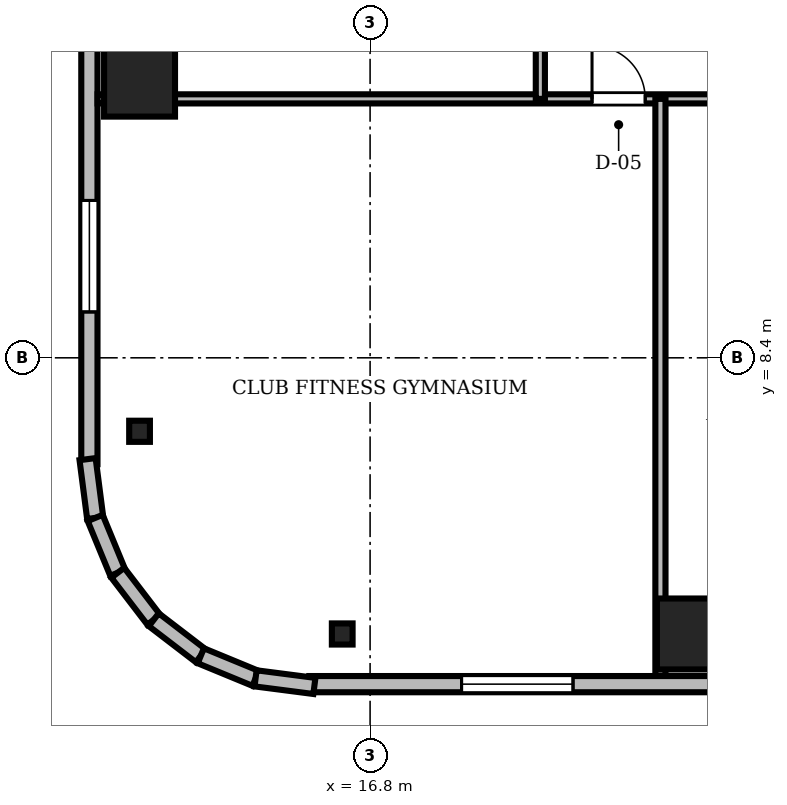
"""IFC4 building model, lengths in metres.
Left out: names, types, materials, properties, quantities, classifications, styles, units other than length and angle.
Written with IfcOpenShell. Run it as: python <this file> out.ifc"""

import sys

from ifc_helpers import new_model, si_unit, direction, frame, frame_2d, origin, origin_2d, place, context, subcontext, project, spatial, rectangle, i_section, extrude, source, transform, mapped, element, fill, save


model = new_model("IFC4")
c1 = context("Model", 3, precision=1e-05, world=origin(), true_north=direction((0.0, 1.0)))
c2 = subcontext(c1, "Body", "Model", "MODEL_VIEW")
j1 = project(units=[si_unit("LENGTHUNIT", "METRE"), si_unit("PLANEANGLEUNIT", "RADIAN")], contexts=[c1])
p1 = place(None, origin())
s1 = spatial("IfcSite", under=j1, at=p1, CompositionType="ELEMENT")
p2 = place(p1, origin())
s2 = spatial("IfcBuilding", under=s1, at=p2, CompositionType="ELEMENT")
p3 = place(p2, frame((0.0, 0.0, 177.2)))
s3 = spatial("IfcBuildingStorey", under=s2, at=p3, CompositionType="ELEMENT", Elevation=177.2)
m1 = source(origin(), c2, "Body", "SweptSolid", [
    extrude(rectangle(XDim=1.4, YDim=1.4, at=origin_2d()), origin(), (0.0, 0.0, 1.0), 3.58),
])
for number, where, z_axis, x_axis in (
    (1, (23.16, 2.95, 0.0), (0.0, 0.0, 1.0), (1.0, 0.0, 0.0)),
    (2, (12.25, 13.86, 0.0), (0.0, 0.0, 1.0), (1.0, 0.0, 0.0)),
):
    element("IfcColumn", number, at=place(p3, frame(where, z_axis=z_axis, x_axis=x_axis)), inside=s3, PredefinedType="COLUMN", context=c2, shape_type="MappedRepresentation", body=[
        mapped(m1, transform((0.0, 0.0, 0.0), scale=1.0)),
    ])
m2 = source(origin(), c2, "Body", "SweptSolid", [
    extrude(i_section(OverallWidth=0.409, OverallDepth=0.417, WebThickness=0.021, FlangeThickness=0.033, FilletRadius=0.015, at=origin_2d()), origin(), (0.0, 0.0, 1.0), 3.58),
])
for number, where, z_axis, x_axis in (
    (3, (16.25, 2.95, 0.0), (0.0, 0.0, 1.0), (1.0, 0.0, 0.0)),
    (4, (12.25, 6.95, 0.0), (0.0, 0.0, 1.0), (1.0, 0.0, 0.0)),
):
    element("IfcColumn", number, at=place(p3, frame(where, z_axis=z_axis, x_axis=x_axis)), inside=s3, PredefinedType="COLUMN", context=c2, shape_type="MappedRepresentation", body=[
        mapped(m2, transform((0.0, 0.0, 0.0), scale=1.0)),
    ])
m3 = source(origin(), c2, "Body", "SweptSolid", [
    extrude(rectangle(XDim=15.6, YDim=0.32, at=frame_2d((7.8, 0.0))), origin(), (0.0, 0.0, 1.0), 3.58),
])
p4 = place(p3, frame((15.6, 1.96, 0.0), z_axis=(0.0, 0.0, 1.0), x_axis=(1.0, 0.0, 0.0)))
e5 = element("IfcWall", 5, at=p4, inside=s3, PredefinedType="SOLIDWALL", context=c2, shape_type="MappedRepresentation", body=[
    mapped(m3, transform((0.0, 0.0, 0.0), scale=1.0)),
])
m4 = source(origin(), c2, "Body", "SweptSolid", [
    extrude(rectangle(XDim=1.4, YDim=2.3, at=frame_2d((0.7, 1.15))), frame((0.0, 0.17, 0.0), z_axis=(0.0, -1.0, 0.0), x_axis=(1.0, 0.0, 0.0)), (0.0, 0.0, 1.0), 0.34),
])
p5 = place(p4, frame((9.61, 0.0, 0.0)))
e6 = element("IfcOpeningElement", 6, at=p5, cuts=e5, PredefinedType="OPENING", context=c2, shape_type="MappedRepresentation", body=[
    mapped(m4, transform((0.0, 0.0, 0.0), scale=1.0)),
])
m5 = source(origin(), c2, "Body", "SweptSolid", [
    extrude(rectangle(XDim=2.2, YDim=2.4, at=frame_2d((1.1, 1.2))), frame((0.0, 0.17, 0.0), z_axis=(0.0, -1.0, 0.0), x_axis=(1.0, 0.0, 0.0)), (0.0, 0.0, 1.0), 0.34),
])
p6 = place(p4, frame((3.005, 0.0, 0.72)))
e7 = element("IfcOpeningElement", 7, at=p6, cuts=e5, PredefinedType="OPENING", context=c2, shape_type="MappedRepresentation", body=[
    mapped(m5, transform((0.0, 0.0, 0.0), scale=1.0)),
])
p7 = place(p3, frame((11.26, 21.9, 0.0), z_axis=(0.0, 0.0, 1.0), x_axis=(0.0, -1.0, 0.0)))
e8 = element("IfcWall", 8, at=p7, inside=s3, PredefinedType="SOLIDWALL", context=c2, shape_type="MappedRepresentation", body=[
    mapped(m3, transform((0.0, 0.0, 0.0), scale=1.0)),
])
p8 = place(p7, frame((10.395, 0.0, 0.72)))
e9 = element("IfcOpeningElement", 9, at=p8, cuts=e8, PredefinedType="OPENING", context=c2, shape_type="MappedRepresentation", body=[
    mapped(m5, transform((0.0, 0.0, 0.0), scale=1.0)),
])
m6 = source(origin(), c2, "Body", "SweptSolid", [
    extrude(rectangle(XDim=1.171, YDim=0.32, at=frame_2d((0.585, 0.0))), origin(), (0.0, 0.0, 1.0), 3.58),
])
p9 = place(p3, frame((11.224, 6.401, 0.0), z_axis=(0.0, 0.0, 1.0), x_axis=(0.128269133229, -0.991739395941, 0.0)))
e10 = element("IfcWall", 10, at=p9, inside=s3, PredefinedType="SOLIDWALL", context=c2, shape_type="MappedRepresentation", body=[
    mapped(m6, transform((0.0, 0.0, 0.0), scale=1.0)),
])
m7 = source(origin(), c2, "Body", "SweptSolid", [
    extrude(rectangle(XDim=1.169, YDim=0.32, at=frame_2d((0.584, 0.0))), origin(), (0.0, 0.0, 1.0), 3.58),
])
for number, where, z_axis, x_axis in (
    (11, (11.375, 5.24, 0.0), (0.0, 0.0, 1.0), (0.381, -0.925, 0.0)),
    (12, (11.82, 4.159, 0.0), (0.0, 0.0, 1.0), (0.608, -0.794, 0.0)),
):
    element("IfcWall", number, at=place(p3, frame(where, z_axis=z_axis, x_axis=x_axis)), inside=s3, PredefinedType="SOLIDWALL", context=c2, shape_type="MappedRepresentation", body=[
        mapped(m7, transform((0.0, 0.0, 0.0), scale=1.0)),
    ])
m8 = source(origin(), c2, "Body", "SweptSolid", [
    extrude(rectangle(XDim=1.169, YDim=0.32, at=frame_2d((0.584, 0.0))), origin(), (0.0, 0.0, 1.0), 3.58),
])
p10 = place(p3, frame((12.531, 3.231, 0.0), z_axis=(0.0, 0.0, 1.0), x_axis=(0.793663520347, -0.608356981114, 0.0)))
e13 = element("IfcWall", 13, at=p10, inside=s3, PredefinedType="SOLIDWALL", context=c2, shape_type="MappedRepresentation", body=[
    mapped(m8, transform((0.0, 0.0, 0.0), scale=1.0)),
])
m9 = source(origin(), c2, "Body", "SweptSolid", [
    extrude(rectangle(XDim=1.169, YDim=0.32, at=frame_2d((0.585, 0.0))), origin(), (0.0, 0.0, 1.0), 3.58),
])
p11 = place(p3, frame((13.459, 2.52, 0.0), z_axis=(0.0, 0.0, 1.0), x_axis=(0.924479075121, -0.381232789334, 0.0)))
e14 = element("IfcWall", 14, at=p11, inside=s3, PredefinedType="SOLIDWALL", context=c2, shape_type="MappedRepresentation", body=[
    mapped(m9, transform((0.0, 0.0, 0.0), scale=1.0)),
])
m10 = source(origin(), c2, "Body", "SweptSolid", [
    extrude(rectangle(XDim=1.17, YDim=0.32, at=frame_2d((0.585, 0.0))), origin(), (0.0, 0.0, 1.0), 3.58),
])
p12 = place(p3, frame((14.54, 2.074, 0.0), z_axis=(0.0, 0.0, 1.0), x_axis=(0.991762485493, -0.128090485085, 0.0)))
e15 = element("IfcWall", 15, at=p12, inside=s3, PredefinedType="SOLIDWALL", context=c2, shape_type="MappedRepresentation", body=[
    mapped(m10, transform((0.0, 0.0, 0.0), scale=1.0)),
])
m11 = source(origin(), c2, "Body", "SweptSolid", [
    extrude(rectangle(XDim=46.156, YDim=0.18, at=frame_2d((23.078, 0.0))), origin(), (0.0, 0.0, 1.0), 2.822),
])
p13 = place(p3, frame((11.422, 13.51, 0.0), z_axis=(0.0, 0.0, 1.0), x_axis=(1.0, 0.0, 0.0)))
e16 = element("IfcWall", 16, at=p13, inside=s3, PredefinedType="PARTITIONING", context=c2, shape_type="MappedRepresentation", body=[
    mapped(m11, transform((0.0, 0.0, 0.0), scale=1.0)),
])
m12 = source(origin(), c2, "Body", "SweptSolid", [
    extrude(rectangle(XDim=1.05, YDim=2.2, at=frame_2d((0.525, 1.1))), frame((0.0, 0.1, 0.0), z_axis=(0.0, -1.0, 0.0), x_axis=(1.0, 0.0, 0.0)), (0.0, 0.0, 1.0), 0.2),
])
p14 = place(p13, frame((9.758, 0.0, 0.0)))
e17 = element("IfcOpeningElement", 17, at=p14, cuts=e16, PredefinedType="OPENING", context=c2, shape_type="MappedRepresentation", body=[
    mapped(m12, transform((0.0, 0.0, 0.0), scale=1.0)),
])
p15 = place(p13, frame((12.878, 0.0, 0.0)))
e18 = element("IfcOpeningElement", 18, at=p15, cuts=e16, PredefinedType="OPENING", context=c2, shape_type="MappedRepresentation", body=[
    mapped(m12, transform((0.0, 0.0, 0.0), scale=1.0)),
])
p16 = place(p13, frame((16.893, 0.0, 0.0)))
e19 = element("IfcOpeningElement", 19, at=p16, cuts=e16, PredefinedType="OPENING", context=c2, shape_type="MappedRepresentation", body=[
    mapped(m12, transform((0.0, 0.0, 0.0), scale=1.0)),
])
p17 = place(p13, frame((20.344, 0.0, 0.0)))
e20 = element("IfcOpeningElement", 20, at=p17, cuts=e16, PredefinedType="OPENING", context=c2, shape_type="MappedRepresentation", body=[
    mapped(m12, transform((0.0, 0.0, 0.0), scale=1.0)),
])
p18 = place(p13, frame((24.008, 0.0, 0.0)))
e21 = element("IfcOpeningElement", 21, at=p18, cuts=e16, PredefinedType="OPENING", context=c2, shape_type="MappedRepresentation", body=[
    mapped(m12, transform((0.0, 0.0, 0.0), scale=1.0)),
])
p19 = place(p13, frame((28.055, 0.0, 0.0)))
e22 = element("IfcOpeningElement", 22, at=p19, cuts=e16, PredefinedType="OPENING", context=c2, shape_type="MappedRepresentation", body=[
    mapped(m12, transform((0.0, 0.0, 0.0), scale=1.0)),
])
m13 = source(origin(), c2, "Body", "SweptSolid", [
    extrude(rectangle(XDim=0.95, YDim=2.15, at=frame_2d((0.475, 1.075))), frame((0.0, 0.1, 0.0), z_axis=(0.0, -1.0, 0.0), x_axis=(1.0, 0.0, 0.0)), (0.0, 0.0, 1.0), 0.2),
])
p20 = place(p13, frame((34.246, 0.0, 0.0)))
e23 = element("IfcOpeningElement", 23, at=p20, cuts=e16, PredefinedType="OPENING", context=c2, shape_type="MappedRepresentation", body=[
    mapped(m13, transform((0.0, 0.0, 0.0), scale=1.0)),
])
p21 = place(p13, frame((37.498, 0.0, 0.0)))
e24 = element("IfcOpeningElement", 24, at=p21, cuts=e16, PredefinedType="OPENING", context=c2, shape_type="MappedRepresentation", body=[
    mapped(m12, transform((0.0, 0.0, 0.0), scale=1.0)),
])
m14 = source(origin(), c2, "Body", "SweptSolid", [
    extrude(rectangle(XDim=15.04, YDim=0.18, at=frame_2d((7.52, 0.0))), origin(), (0.0, 0.0, 1.0), 3.022),
])
p22 = place(p3, frame((20.16, 13.51, 0.0), z_axis=(0.0, 0.0, 1.0), x_axis=(0.0, 1.0, 0.0)))
e25 = element("IfcWall", 25, at=p22, inside=s3, PredefinedType="PARTITIONING", context=c2, shape_type="MappedRepresentation", body=[
    mapped(m14, transform((0.0, 0.0, 0.0), scale=1.0)),
])
p23 = place(p22, frame((3.202, 0.0, 0.0)))
e26 = element("IfcOpeningElement", 26, at=p23, cuts=e25, PredefinedType="OPENING", context=c2, shape_type="MappedRepresentation", body=[
    mapped(m12, transform((0.0, 0.0, 0.0), scale=1.0)),
])
p24 = place(p22, frame((11.873, 0.0, 0.0)))
e27 = element("IfcOpeningElement", 27, at=p24, cuts=e25, PredefinedType="OPENING", context=c2, shape_type="MappedRepresentation", body=[
    mapped(m13, transform((0.0, 0.0, 0.0), scale=1.0)),
])
m15 = source(origin(), c2, "Body", "SweptSolid", [
    extrude(rectangle(XDim=11.388, YDim=0.2, at=frame_2d((5.694, 0.0))), origin(), (0.0, 0.0, 1.0), 2.822),
])
p25 = place(p3, frame((22.53, 2.122, 0.0), z_axis=(0.0, 0.0, 1.0), x_axis=(0.0, 1.0, 0.0)))
e28 = element("IfcWall", 28, at=p25, inside=s3, PredefinedType="PARTITIONING", context=c2, shape_type="MappedRepresentation", body=[
    mapped(m15, transform((0.0, 0.0, 0.0), scale=1.0)),
])
m16 = source(origin(), c2, "Body", "SweptSolid", [
    extrude(rectangle(XDim=2.2, YDim=2.4, at=frame_2d((1.1, 1.2))), frame((0.0, 0.03, 0.0), z_axis=(0.0, -1.0, 0.0), x_axis=(1.0, 0.0, 0.0)), (0.0, 0.0, 1.0), 0.06),
])
p26 = place(p6, origin())
e29 = element("IfcWindow", 29, at=p26, inside=s3, PartitioningType="SINGLE_PANEL", PredefinedType="WINDOW", context=c2, shape_type="MappedRepresentation", body=[
    mapped(m16, transform((0.0, 0.0, 0.0), scale=1.0)),
])
fill(e7, e29)
p27 = place(p8, origin())
e30 = element("IfcWindow", 30, at=p27, inside=s3, PartitioningType="SINGLE_PANEL", PredefinedType="WINDOW", context=c2, shape_type="MappedRepresentation", body=[
    mapped(m16, transform((0.0, 0.0, 0.0), scale=1.0)),
])
fill(e9, e30)
m17 = source(origin(), c2, "Body", "SweptSolid", [
    extrude(rectangle(XDim=1.05, YDim=2.2, at=frame_2d((0.525, 1.1))), frame((0.0, 0.025, 0.0), z_axis=(0.0, -1.0, 0.0), x_axis=(1.0, 0.0, 0.0)), (0.0, 0.0, 1.0), 0.05),
])
p28 = place(p14, origin())
e31 = element("IfcDoor", 31, at=p28, inside=s3, OperationType="SINGLE_SWING_LEFT", PredefinedType="DOOR", context=c2, shape_type="MappedRepresentation", body=[
    mapped(m17, transform((0.0, 0.0, 0.0), scale=1.0)),
])
fill(e17, e31)
save(model, sys.argv[1])
